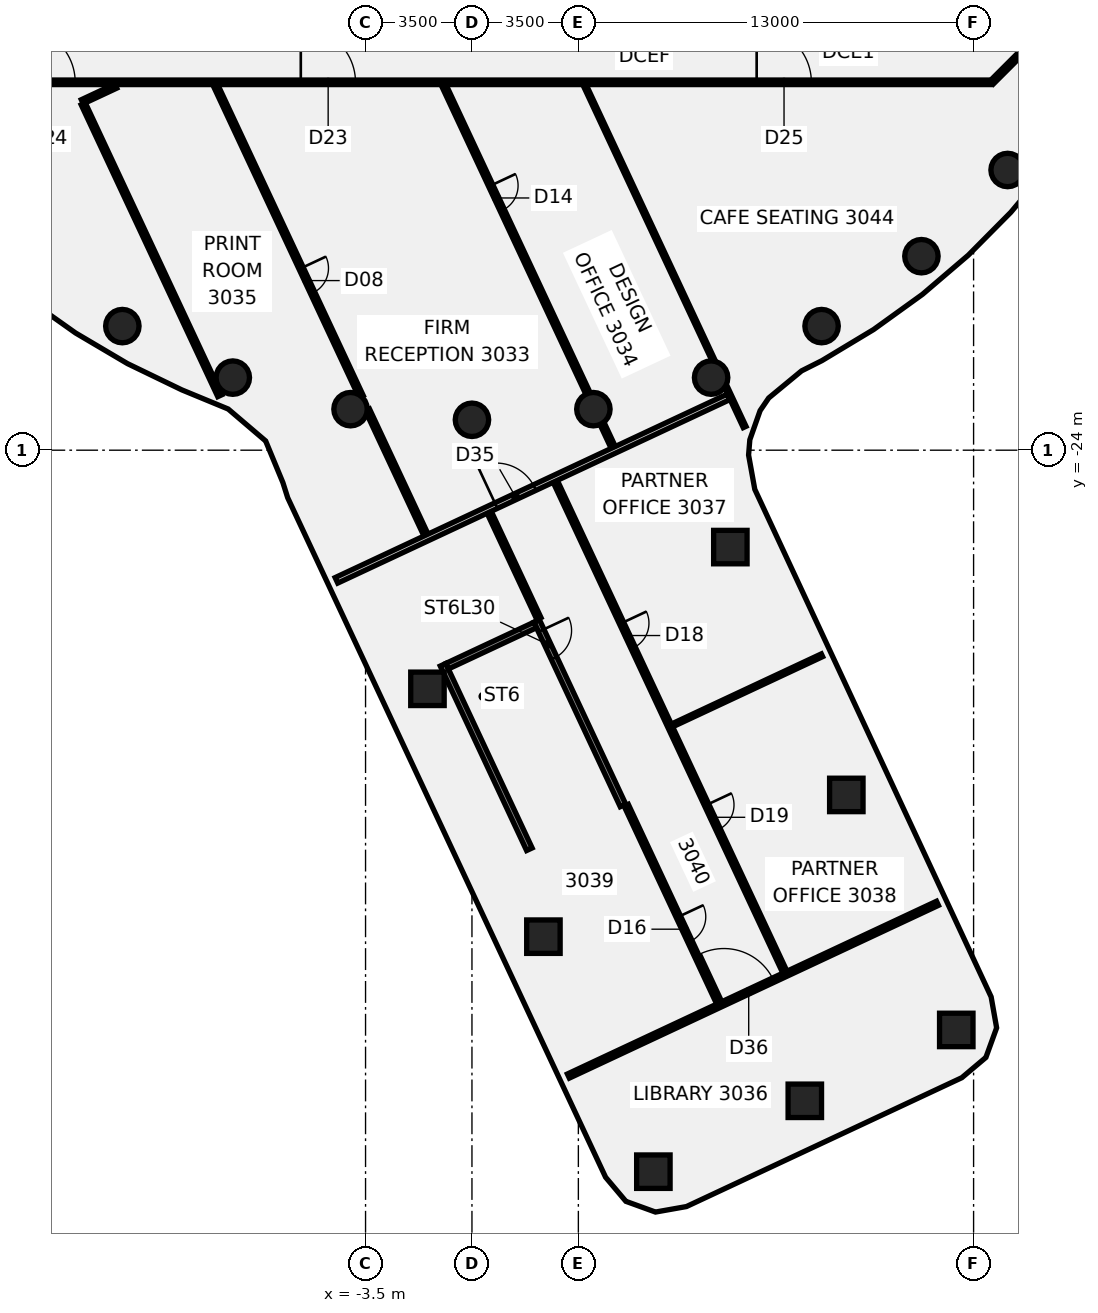
"""IFC4 building model, lengths in metres.
Left out: names, types, materials, properties, quantities, classifications, styles, units other than length and angle.
Written with IfcOpenShell. Run it as: python <this file> out.ifc"""

import sys

from ifc_helpers import new_model, si_unit, direction, frame, frame_2d, origin, origin_2d, place, context, subcontext, project, spatial, polyline, rectangle, circle, outline, extrude, element, fill, save


model = new_model("IFC4")
c1 = context("Model", 3, precision=1e-05, world=origin(), true_north=direction((0.0, 1.0)))
c2 = subcontext(c1, "Body", "Model", "MODEL_VIEW")
j1 = project(units=[si_unit("LENGTHUNIT", "METRE"), si_unit("PLANEANGLEUNIT", "RADIAN")], contexts=[c1])
p1 = place(None, origin())
s1 = spatial("IfcSite", under=j1, at=p1, CompositionType="ELEMENT")
p2 = place(p1, origin())
s2 = spatial("IfcBuilding", under=s1, at=p2, CompositionType="ELEMENT")
p3 = place(p2, frame((0.0, 0.0, 124.75)))
s3 = spatial("IfcBuildingStorey", under=s2, at=p3, CompositionType="ELEMENT", Elevation=124.75)
for number, where, z_axis, x_axis in (
    (1, (-11.5, -19.919, -0.14), (0.0, 0.0, 1.0), (1.0, 0.0, 0.0)),
    (2, (-7.866, -21.613, -0.14), (0.0, 0.0, 1.0), (1.0, 0.0, 0.0)),
    (3, (-3.994, -22.651, -0.14), (0.0, 0.0, 1.0), (1.0, 0.0, 0.0)),
    (4, (0.0, -23.0, -0.14), (0.0, 0.0, 1.0), (1.0, 0.0, 0.0)),
    (5, (3.994, -22.651, -0.14), (0.0, 0.0, 1.0), (1.0, 0.0, 0.0)),
    (6, (7.866, -21.613, -0.14), (0.0, 0.0, 1.0), (1.0, 0.0, 0.0)),
    (7, (11.5, -19.919, -0.14), (0.0, 0.0, 1.0), (1.0, 0.0, 0.0)),
    (8, (14.784, -17.619, -0.14), (0.0, 0.0, 1.0), (1.0, 0.0, 0.0)),
    (9, (17.619, -14.784, -0.14), (0.0, 0.0, 1.0), (1.0, 0.0, 0.0)),
):
    element("IfcColumn", number, at=place(p3, frame(where, z_axis=z_axis, x_axis=x_axis)), inside=s3, PredefinedType="COLUMN", context=c2, shape_type="SweptSolid", body=[
        extrude(circle(Radius=0.55, at=origin_2d()), origin(), (0.0, 0.0, 1.0), 3.71),
    ])
p4 = place(p3, frame((12.314, -35.338, -0.138), z_axis=(0.064699855868, 0.060824433029, 0.9960493547), x_axis=(-0.903035286049, -0.421197702581, 0.084378714676)))
e10 = element("IfcColumn", 10, at=p4, inside=s3, PredefinedType="COLUMN", context=c2, shape_type="SweptSolid", body=[
    extrude(rectangle(XDim=1.1, YDim=1.1, at=origin_2d()), origin(), (0.0, 0.0, 1.0), 3.717),
])
p5 = place(p3, frame((2.35, -40.0, -0.138), z_axis=(0.088034741194, 0.012351142794, 0.996040829291), x_axis=(-0.423052547946, 0.905727436668, 0.026160125068)))
e11 = element("IfcColumn", 11, at=p5, inside=s3, PredefinedType="COLUMN", context=c2, shape_type="SweptSolid", body=[
    extrude(rectangle(XDim=1.1, YDim=1.1, at=origin_2d()), origin(), (0.0, 0.0, 1.0), 3.716),
])
p6 = place(p3, frame((8.499, -27.187, -0.139), z_axis=(0.025080401947, 0.041932325564, 0.998805613476), x_axis=(-0.905336041768, -0.422762183328, 0.040481944421)))
e12 = element("IfcColumn", 12, at=p6, inside=s3, PredefinedType="COLUMN", context=c2, shape_type="SweptSolid", body=[
    extrude(rectangle(XDim=1.1, YDim=1.1, at=origin_2d()), origin(), (0.0, 0.0, 1.0), 3.709),
])
p7 = place(p3, frame((-1.464, -31.849, -0.139), z_axis=(0.048386644022, -0.00678071338, 0.998805664084), x_axis=(-0.422461295082, 0.905990074096, 0.026616532396)))
e13 = element("IfcColumn", 13, at=p7, inside=s3, PredefinedType="COLUMN", context=c2, shape_type="SweptSolid", body=[
    extrude(rectangle(XDim=1.1, YDim=1.1, at=origin_2d()), origin(), (0.0, 0.0, 1.0), 3.708),
])
p8 = place(p3, frame((5.967, -47.73, -0.138), z_axis=(0.130588259864, 0.019038669148, 0.991253870339), x_axis=(-0.421679598548, 0.905941901453, 0.038152160609)))
e14 = element("IfcColumn", 14, at=p8, inside=s3, PredefinedType="COLUMN", context=c2, shape_type="SweptSolid", body=[
    extrude(rectangle(XDim=1.1, YDim=1.1, at=origin_2d()), origin(), (0.0, 0.0, 1.0), 3.732),
])
p9 = place(p3, frame((10.949, -45.399, -0.138), z_axis=(0.119116596528, 0.043196128411, 0.991940185153), x_axis=(-0.423188341029, 0.905970442825, 0.011365946715)))
e15 = element("IfcColumn", 15, at=p9, inside=s3, PredefinedType="COLUMN", context=c2, shape_type="SweptSolid", body=[
    extrude(rectangle(XDim=1.1, YDim=1.1, at=origin_2d()), origin(), (0.0, 0.0, 1.0), 3.73),
])
p10 = place(p3, frame((15.93, -43.068, -0.138), z_axis=(0.107515850964, 0.067336464177, 0.991920431478), x_axis=(-0.899037513011, -0.419376139534, 0.125917448308)))
e16 = element("IfcColumn", 16, at=p10, inside=s3, PredefinedType="COLUMN", context=c2, shape_type="SweptSolid", body=[
    extrude(rectangle(XDim=1.1, YDim=1.1, at=origin_2d()), origin(), (0.0, 0.0, 1.0), 3.731),
])
p11 = place(p3, frame((-12.785, -12.608, 0.0), z_axis=(0.0, 0.0, 1.0), x_axis=(0.423824721298, -0.905744227482, 0.0)))
e17 = element("IfcWall", 17, at=p11, inside=s3, PredefinedType="PARTITIONING", context=c2, shape_type="SweptSolid", body=[
    extrude(rectangle(XDim=10.599, YDim=0.15, at=frame_2d((5.299, 0.0))), origin(), (0.0, 0.0, 1.0), 2.97),
])
p12 = place(p3, frame((-8.438, -11.99, 0.0), z_axis=(0.0, 0.0, 1.0), x_axis=(0.423822202293, -0.905745406195, 0.0)))
e18 = element("IfcWall", 18, at=p12, inside=s3, PredefinedType="PARTITIONING", context=c2, shape_type="SweptSolid", body=[
    extrude(rectangle(XDim=11.312, YDim=0.15, at=frame_2d((5.656, 0.0))), origin(), (0.0, 0.0, 1.0), 2.97),
])
p13 = place(p12, frame((6.65, 0.0, 0.0)))
e19 = element("IfcOpeningElement", 19, at=p13, cuts=e18, PredefinedType="OPENING", context=c2, shape_type="SweptSolid", body=[
    extrude(rectangle(XDim=0.9, YDim=2.1, at=frame_2d((0.45, 1.05))), frame((0.0, 0.085, 0.0), z_axis=(0.0, -1.0, 0.0), x_axis=(1.0, 0.0, 0.0)), (0.0, 0.0, 1.0), 0.17),
])
p14 = place(p3, frame((-3.44, -22.672, 0.0), z_axis=(0.0, 0.0, 1.0), x_axis=(0.423855723132, -0.905729720153, 0.0)))
e20 = element("IfcWall", 20, at=p14, inside=s3, PredefinedType="PARTITIONING", context=c2, shape_type="SweptSolid", body=[
    extrude(rectangle(XDim=4.545, YDim=0.15, at=frame_2d((2.272, 0.0))), origin(), (0.0, 0.0, 1.0), 2.97),
])
p15 = place(p3, frame((-0.93, -11.99, 0.0), z_axis=(0.0, 0.0, 1.0), x_axis=(0.42379671438, -0.905757332226, 0.0)))
e21 = element("IfcWall", 21, at=p15, inside=s3, PredefinedType="PARTITIONING", context=c2, shape_type="SweptSolid", body=[
    extrude(rectangle(XDim=11.203, YDim=0.15, at=frame_2d((5.602, 0.0))), origin(), (0.0, 0.0, 1.0), 2.97),
])
p16 = place(p15, frame((3.65, 0.0, 0.0)))
e22 = element("IfcOpeningElement", 22, at=p16, cuts=e21, PredefinedType="OPENING", context=c2, shape_type="SweptSolid", body=[
    extrude(rectangle(XDim=0.9, YDim=2.1, at=frame_2d((0.45, 1.05))), frame((0.0, 0.085, 0.0), z_axis=(0.0, -1.0, 0.0), x_axis=(1.0, 0.0, 0.0)), (0.0, 0.0, 1.0), 0.17),
])
p17 = place(p3, frame((4.281, -23.128, 0.0), z_axis=(0.0, 0.0, 1.0), x_axis=(0.423756569473, -0.905776114627, 0.0)))
e23 = element("IfcWall", 23, at=p17, inside=s3, PredefinedType="PARTITIONING", context=c2, shape_type="SweptSolid", body=[
    extrude(rectangle(XDim=0.859, YDim=0.15, at=frame_2d((0.43, 0.0))), origin(), (0.0, 0.0, 1.0), 2.87),
])
p18 = place(p3, frame((0.566, -26.041, 0.0), z_axis=(0.0, 0.0, 1.0), x_axis=(0.423709382573, -0.905798188958, 0.0)))
e24 = element("IfcWall", 24, at=p18, inside=s3, PredefinedType="PARTITIONING", context=c2, shape_type="SweptSolid", body=[
    extrude(rectangle(XDim=3.86, YDim=0.15, at=frame_2d((1.93, 0.0))), origin(), (0.0, 0.0, 1.0), 2.87),
])
p19 = place(p3, frame((5.075, -35.678, 0.0), z_axis=(0.0, 0.0, 1.0), x_axis=(0.423708057889, -0.905798808611, 0.0)))
e25 = element("IfcWall", 25, at=p19, inside=s3, PredefinedType="PARTITIONING", context=c2, shape_type="SweptSolid", body=[
    extrude(rectangle(XDim=7.18, YDim=0.15, at=frame_2d((3.59, 0.0))), origin(), (0.0, 0.0, 1.0), 2.87),
])
p20 = place(p19, frame((4.05, 0.0, 0.0)))
e26 = element("IfcOpeningElement", 26, at=p20, cuts=e25, PredefinedType="OPENING", context=c2, shape_type="SweptSolid", body=[
    extrude(rectangle(XDim=0.9, YDim=2.1, at=frame_2d((0.45, 1.05))), frame((0.0, 0.085, 0.0), z_axis=(0.0, -1.0, 0.0), x_axis=(1.0, 0.0, 0.0)), (0.0, 0.0, 1.0), 0.17),
])
p21 = place(p3, frame((2.741, -25.028, 0.0), z_axis=(0.0, 0.0, 1.0), x_axis=(0.423815496234, -0.905748544107, 0.0)))
e27 = element("IfcWall", 27, at=p21, inside=s3, PredefinedType="PARTITIONING", context=c2, shape_type="SweptSolid", body=[
    extrude(rectangle(XDim=17.816, YDim=0.15, at=frame_2d((8.908, 0.0))), origin(), (0.0, 0.0, 1.0), 2.87),
])
p22 = place(p21, frame((5.145, 0.0, 0.0)))
e28 = element("IfcOpeningElement", 28, at=p22, cuts=e27, PredefinedType="OPENING", context=c2, shape_type="SweptSolid", body=[
    extrude(rectangle(XDim=0.9, YDim=2.1, at=frame_2d((0.45, 1.05))), frame((0.0, 0.085, 0.0), z_axis=(0.0, -1.0, 0.0), x_axis=(1.0, 0.0, 0.0)), (0.0, 0.0, 1.0), 0.17),
])
p23 = place(p21, frame((11.746, 0.0, 0.0)))
e29 = element("IfcOpeningElement", 29, at=p23, cuts=e27, PredefinedType="OPENING", context=c2, shape_type="SweptSolid", body=[
    extrude(rectangle(XDim=0.9, YDim=2.1, at=frame_2d((0.45, 1.05))), frame((0.0, 0.085, 0.0), z_axis=(0.0, -1.0, 0.0), x_axis=(1.0, 0.0, 0.0)), (0.0, 0.0, 1.0), 0.17),
])
p24 = place(p3, frame((3.701, -11.977, 0.0), z_axis=(0.0, 0.0, 1.0), x_axis=(0.423784466957, -0.905763062597, 0.0)))
e30 = element("IfcWall", 30, at=p24, inside=s3, PredefinedType="PARTITIONING", context=c2, shape_type="SweptSolid", body=[
    extrude(rectangle(XDim=10.048, YDim=0.1, at=frame_2d((5.024, 0.0))), origin(), (0.0, 0.0, 1.0), 2.97),
])
p25 = place(p3, frame((8.344, -21.9, 0.0), z_axis=(0.0, 0.0, 1.0), x_axis=(0.423763938656, -0.905772667006, 0.0)))
e31 = element("IfcWall", 31, at=p25, inside=s3, PredefinedType="PARTITIONING", context=c2, shape_type="SweptSolid", body=[
    extrude(rectangle(XDim=1.475, YDim=0.1, at=frame_2d((0.738, 0.0))), origin(), (0.0, 0.0, 1.0), 2.97),
])
p26 = place(p3, frame((-17.1, -11.9, 0.0), z_axis=(0.0, 0.0, 1.0), x_axis=(1.0, 0.0, 0.0)))
e32 = element("IfcWall", 32, at=p26, inside=s3, PredefinedType="PARTITIONING", context=c2, shape_type="SweptSolid", body=[
    extrude(rectangle(XDim=34.165, YDim=0.15, at=frame_2d((17.083, 0.0))), origin(), (0.0, 0.0, 1.0), 2.97),
])
p27 = place(p26, frame((11.47, 0.0, 0.0)))
e33 = element("IfcOpeningElement", 33, at=p27, cuts=e32, PredefinedType="OPENING", context=c2, shape_type="SweptSolid", body=[
    extrude(rectangle(XDim=1.8, YDim=2.1, at=frame_2d((0.9, 1.05))), frame((0.0, 0.085, 0.0), z_axis=(0.0, -1.0, 0.0), x_axis=(1.0, 0.0, 0.0)), (0.0, 0.0, 1.0), 0.17),
])
p28 = place(p26, frame((2.25, 0.0, 0.0)))
e34 = element("IfcOpeningElement", 34, at=p28, cuts=e32, PredefinedType="OPENING", context=c2, shape_type="SweptSolid", body=[
    extrude(rectangle(XDim=1.8, YDim=2.1, at=frame_2d((0.9, 1.05))), frame((0.0, 0.085, 0.0), z_axis=(0.0, -1.0, 0.0), x_axis=(1.0, 0.0, 0.0)), (0.0, 0.0, 1.0), 0.17),
])
p29 = place(p26, frame((26.465, 0.0, 0.0)))
e35 = element("IfcOpeningElement", 35, at=p29, cuts=e32, PredefinedType="OPENING", context=c2, shape_type="SweptSolid", body=[
    extrude(rectangle(XDim=1.8, YDim=2.1, at=frame_2d((0.9, 1.05))), frame((0.0, 0.085, 0.0), z_axis=(0.0, -1.0, 0.0), x_axis=(1.0, 0.0, 0.0)), (0.0, 0.0, 1.0), 0.17),
])
p30 = place(p3, frame((-12.817, -12.54, 0.0), z_axis=(0.0, 0.0, 1.0), x_axis=(0.905880352608, 0.423533690229, 0.0)))
e36 = element("IfcWall", 36, at=p30, inside=s3, PredefinedType="PARTITIONING", context=c2, shape_type="SweptSolid", body=[
    extrude(rectangle(XDim=1.216, YDim=0.15, at=frame_2d((0.608, 0.0))), origin(), (0.0, 0.0, 1.0), 2.97),
])
p31 = place(p3, frame((-4.457, -28.281, 0.0), z_axis=(0.0, 0.0, 1.0), x_axis=(0.905756469358, 0.423798558534, 0.0)))
e37 = element("IfcWall", 37, at=p31, inside=s3, PredefinedType="PARTITIONING", context=c2, shape_type="SweptSolid", body=[
    extrude(rectangle(XDim=14.239, YDim=0.2, at=frame_2d((7.12, 0.0))), origin(), (0.0, 0.0, 1.0), 2.87),
])
p32 = place(p31, frame((5.8, 0.0, 0.0)))
e38 = element("IfcOpeningElement", 38, at=p32, cuts=e37, PredefinedType="OPENING", context=c2, shape_type="SweptSolid", body=[
    extrude(rectangle(XDim=1.4, YDim=2.1, at=frame_2d((0.7, 1.05))), frame((0.0, 0.11, 0.0), z_axis=(0.0, -1.0, 0.0), x_axis=(1.0, 0.0, 0.0)), (0.0, 0.0, 1.0), 0.22),
])
p33 = place(p3, frame((3.171, -44.584, 0.0), z_axis=(0.0, 0.0, 1.0), x_axis=(0.905741999601, 0.423829482409, 0.0)))
e39 = element("IfcWall", 39, at=p33, inside=s3, PredefinedType="PARTITIONING", context=c2, shape_type="SweptSolid", body=[
    extrude(rectangle(XDim=13.404, YDim=0.15, at=frame_2d((6.702, 0.0))), origin(), (0.0, 0.0, 1.0), 2.87),
])
p34 = place(p33, frame((5.649, 0.0, 0.0)))
e40 = element("IfcOpeningElement", 40, at=p34, cuts=e39, PredefinedType="OPENING", context=c2, shape_type="SweptSolid", body=[
    extrude(rectangle(XDim=1.8, YDim=2.1, at=frame_2d((0.9, 1.05))), frame((0.0, 0.085, 0.0), z_axis=(0.0, -1.0, 0.0), x_axis=(1.0, 0.0, 0.0)), (0.0, 0.0, 1.0), 0.17),
])
p35 = place(p3, frame((6.58, -33.053, 0.0), z_axis=(0.0, 0.0, 1.0), x_axis=(0.905786512013, 0.423734344438, 0.0)))
e41 = element("IfcWall", 41, at=p35, inside=s3, PredefinedType="PARTITIONING", context=c2, shape_type="SweptSolid", body=[
    extrude(rectangle(XDim=5.447, YDim=0.1, at=frame_2d((2.723, 0.0))), origin(), (0.0, 0.0, 1.0), 2.97),
])
p36 = place(p3, frame((17.1, -11.9, 0.0), z_axis=(0.0, 0.0, 1.0), x_axis=(0.707106781187, 0.707106781187, 0.0)))
e42 = element("IfcWall", 42, at=p36, inside=s3, PredefinedType="PARTITIONING", context=c2, shape_type="SweptSolid", body=[
    extrude(rectangle(XDim=2.505, YDim=0.15, at=frame_2d((1.253, 0.0))), origin(), (0.0, 0.0, 1.0), 2.97),
])
p37 = place(p3, frame((2.128, -29.616, -0.14), z_axis=(0.0, 0.0, 1.0), x_axis=(0.42381482053, -0.90574886028, 0.0)))
e43 = element("IfcWall", 43, at=p37, inside=s3, PredefinedType="SHEAR", context=c2, shape_type="SweptSolid", body=[
    extrude(rectangle(XDim=6.7, YDim=0.2, at=frame_2d((3.35, 0.0))), origin(), (0.0, 0.0, 1.0), 3.01),
])
p38 = place(p37, frame((0.35, 0.0, 0.0)))
e44 = element("IfcOpeningElement", 44, at=p38, cuts=e43, PredefinedType="OPENING", context=c2, shape_type="SweptSolid", body=[
    extrude(rectangle(XDim=1.0, YDim=2.1, at=frame_2d((0.5, 1.05))), frame((0.0, 0.11, 0.0), z_axis=(0.0, -1.0, 0.0), x_axis=(1.0, 0.0, 0.0)), (0.0, 0.0, 1.0), 0.22),
])
p39 = place(p3, frame((-0.951, -31.057, -0.14), z_axis=(0.0, 0.0, 1.0), x_axis=(0.423828808535, -0.90574231493, 0.0)))
e45 = element("IfcWall", 45, at=p39, inside=s3, PredefinedType="SHEAR", context=c2, shape_type="SweptSolid", body=[
    extrude(rectangle(XDim=6.7, YDim=0.2, at=frame_2d((3.35, 0.0))), origin(), (0.0, 0.0, 1.0), 3.01),
])
p40 = place(p3, frame((-0.818, -31.105, -0.14), z_axis=(0.0, 0.0, 1.0), x_axis=(0.905751920053, 0.423808281325, 0.0)))
e46 = element("IfcWall", 46, at=p40, inside=s3, PredefinedType="SHEAR", context=c2, shape_type="SweptSolid", body=[
    extrude(rectangle(XDim=3.2, YDim=0.2, at=frame_2d((1.6, 0.0))), origin(), (0.0, 0.0, 1.0), 3.01),
])
p41 = place(p3, frame((0.0, 0.0, -0.14)))
e47 = element("IfcWall", 47, at=p41, inside=s3, PredefinedType="SHEAR", context=c2, shape_type="SweptSolid", body=[
    extrude(outline(polyline([(1.894, -36.902), (1.979, -37.083), (4.877, -35.727), (4.792, -35.546), (1.894, -36.902)])), origin(), (0.0, 0.0, 1.0), 3.01),
])
p42 = place(p13, frame((0.9, 0.0, 0.0), z_axis=(0.0, 0.0, 1.0), x_axis=(-1.0, 0.0, 0.0)))
e48 = element("IfcDoor", 48, at=p42, inside=s3, OperationType="SINGLE_SWING_RIGHT", PredefinedType="DOOR", context=c2, shape_type="SweptSolid", body=[
    extrude(rectangle(XDim=0.9, YDim=2.1, at=frame_2d((0.45, 1.05))), frame((0.0, 0.025, 0.0), z_axis=(0.0, -1.0, 0.0), x_axis=(1.0, 0.0, 0.0)), (0.0, 0.0, 1.0), 0.05),
])
fill(e19, e48)
p43 = place(p16, origin())
e49 = element("IfcDoor", 49, at=p43, inside=s3, OperationType="SINGLE_SWING_RIGHT", PredefinedType="DOOR", context=c2, shape_type="SweptSolid", body=[
    extrude(rectangle(XDim=0.9, YDim=2.1, at=frame_2d((0.45, 1.05))), frame((0.0, 0.025, 0.0), z_axis=(0.0, -1.0, 0.0), x_axis=(1.0, 0.0, 0.0)), (0.0, 0.0, 1.0), 0.05),
])
fill(e22, e49)
p44 = place(p20, frame((0.9, 0.0, 0.0), z_axis=(0.0, 0.0, 1.0), x_axis=(-1.0, 0.0, 0.0)))
e50 = element("IfcDoor", 50, at=p44, inside=s3, OperationType="SINGLE_SWING_RIGHT", PredefinedType="DOOR", context=c2, shape_type="SweptSolid", body=[
    extrude(rectangle(XDim=0.9, YDim=2.1, at=frame_2d((0.45, 1.05))), frame((0.0, 0.025, 0.0), z_axis=(0.0, -1.0, 0.0), x_axis=(1.0, 0.0, 0.0)), (0.0, 0.0, 1.0), 0.05),
])
fill(e26, e50)
p45 = place(p22, origin())
e51 = element("IfcDoor", 51, at=p45, inside=s3, OperationType="SINGLE_SWING_RIGHT", PredefinedType="DOOR", context=c2, shape_type="SweptSolid", body=[
    extrude(rectangle(XDim=0.9, YDim=2.1, at=frame_2d((0.45, 1.05))), frame((0.0, 0.025, 0.0), z_axis=(0.0, -1.0, 0.0), x_axis=(1.0, 0.0, 0.0)), (0.0, 0.0, 1.0), 0.05),
])
fill(e28, e51)
p46 = place(p23, origin())
e52 = element("IfcDoor", 52, at=p46, inside=s3, OperationType="SINGLE_SWING_LEFT", PredefinedType="DOOR", context=c2, shape_type="SweptSolid", body=[
    extrude(rectangle(XDim=0.9, YDim=2.1, at=frame_2d((0.45, 1.05))), frame((0.0, 0.025, 0.0), z_axis=(0.0, -1.0, 0.0), x_axis=(1.0, 0.0, 0.0)), (0.0, 0.0, 1.0), 0.05),
])
fill(e29, e52)
p47 = place(p27, origin())
e53 = element("IfcDoor", 53, at=p47, inside=s3, OperationType="DOUBLE_DOOR_SINGLE_SWING", PredefinedType="DOOR", context=c2, shape_type="SweptSolid", body=[
    extrude(rectangle(XDim=1.8, YDim=2.1, at=frame_2d((0.9, 1.05))), frame((0.0, 0.025, 0.0), z_axis=(0.0, -1.0, 0.0), x_axis=(1.0, 0.0, 0.0)), (0.0, 0.0, 1.0), 0.05),
])
fill(e33, e53)
p48 = place(p28, frame((1.8, 0.0, 0.0), z_axis=(0.0, 0.0, 1.0), x_axis=(-1.0, 0.0, 0.0)))
e54 = element("IfcDoor", 54, at=p48, inside=s3, OperationType="DOUBLE_DOOR_SINGLE_SWING", PredefinedType="DOOR", context=c2, shape_type="SweptSolid", body=[
    extrude(rectangle(XDim=1.8, YDim=2.1, at=frame_2d((0.9, 1.05))), frame((0.0, 0.025, 0.0), z_axis=(0.0, -1.0, 0.0), x_axis=(1.0, 0.0, 0.0)), (0.0, 0.0, 1.0), 0.05),
])
fill(e34, e54)
p49 = place(p29, frame((1.8, 0.0, 0.0), z_axis=(0.0, 0.0, 1.0), x_axis=(-1.0, 0.0, 0.0)))
e55 = element("IfcDoor", 55, at=p49, inside=s3, OperationType="DOUBLE_DOOR_SINGLE_SWING", PredefinedType="DOOR", context=c2, shape_type="SweptSolid", body=[
    extrude(rectangle(XDim=1.8, YDim=2.1, at=frame_2d((0.9, 1.05))), frame((0.0, 0.025, 0.0), z_axis=(0.0, -1.0, 0.0), x_axis=(1.0, 0.0, 0.0)), (0.0, 0.0, 1.0), 0.05),
])
fill(e35, e55)
p50 = place(p32, origin())
e56 = element("IfcDoor", 56, at=p50, inside=s3, OperationType="DOUBLE_DOOR_SINGLE_SWING", PredefinedType="DOOR", context=c2, shape_type="SweptSolid", body=[
    extrude(rectangle(XDim=1.4, YDim=2.1, at=frame_2d((0.7, 1.05))), frame((0.0, 0.025, 0.0), z_axis=(0.0, -1.0, 0.0), x_axis=(1.0, 0.0, 0.0)), (0.0, 0.0, 1.0), 0.05),
])
fill(e38, e56)
p51 = place(p34, frame((1.8, 0.0, 0.0), z_axis=(0.0, 0.0, 1.0), x_axis=(-1.0, 0.0, 0.0)))
e57 = element("IfcDoor", 57, at=p51, inside=s3, OperationType="DOUBLE_DOOR_SINGLE_SWING", PredefinedType="DOOR", context=c2, shape_type="SweptSolid", body=[
    extrude(rectangle(XDim=1.8, YDim=2.1, at=frame_2d((0.9, 1.05))), frame((0.0, 0.025, 0.0), z_axis=(0.0, -1.0, 0.0), x_axis=(1.0, 0.0, 0.0)), (0.0, 0.0, 1.0), 0.05),
])
fill(e40, e57)
p52 = place(p38, origin())
e58 = element("IfcDoor", 58, at=p52, inside=s3, OperationType="SINGLE_SWING_LEFT", PredefinedType="DOOR", context=c2, shape_type="SweptSolid", body=[
    extrude(rectangle(XDim=1.0, YDim=2.1, at=frame_2d((0.5, 1.05))), frame((0.0, 0.025, 0.0), z_axis=(0.0, -1.0, 0.0), x_axis=(1.0, 0.0, 0.0)), (0.0, 0.0, 1.0), 0.05),
])
fill(e44, e58)
save(model, sys.argv[1])
